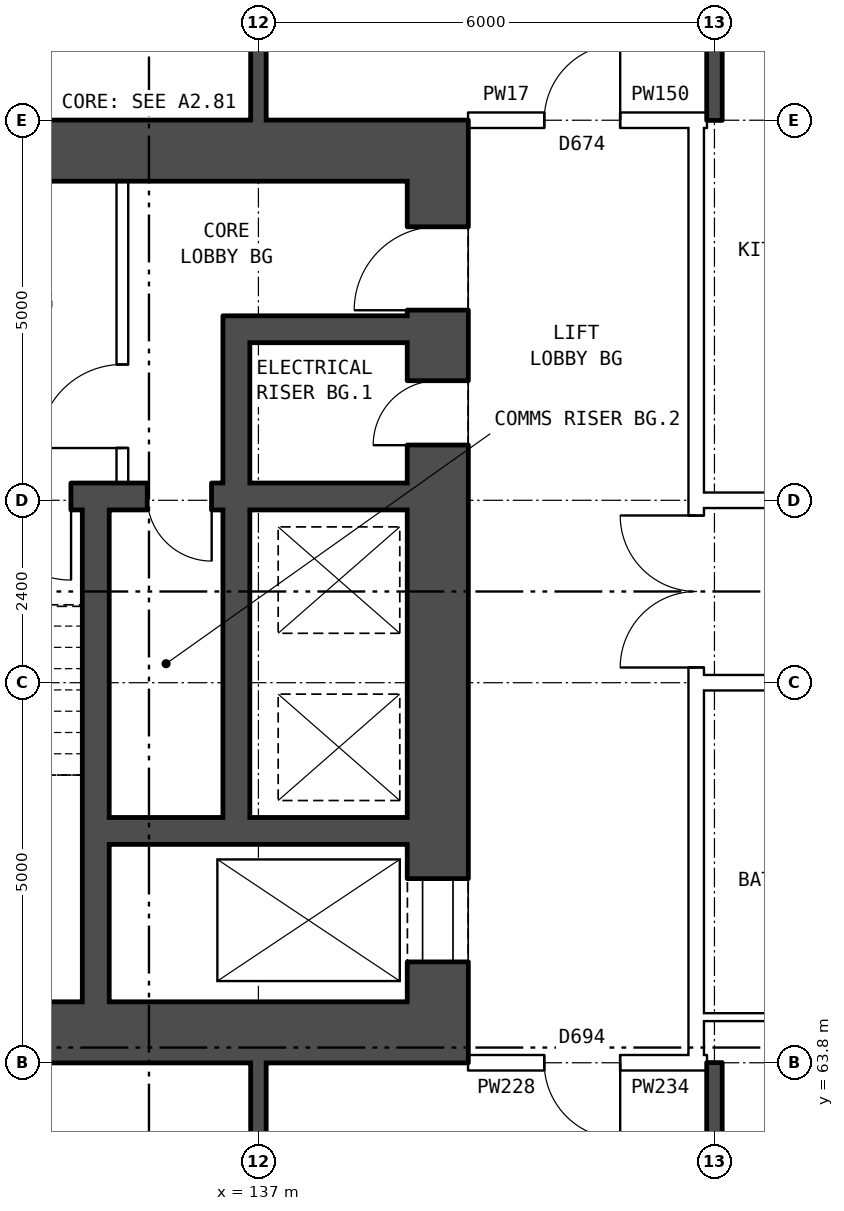
"""IFC4 building model, lengths in metres.
Left out: names, types, materials, properties, quantities, classifications, styles, units other than length and angle.
Written with IfcOpenShell. Run it as: python <this file> out.ifc"""

import sys

from ifc_helpers import new_model, si_unit, direction, frame, frame_2d, origin, place, context, subcontext, project, spatial, rectangle, extrude, element, fill, save


model = new_model("IFC4")
c1 = context("Model", 3, precision=1e-05, world=origin(), true_north=direction((0.0, 1.0)))
c2 = subcontext(c1, "Body", "Model", "MODEL_VIEW")
j1 = project(units=[si_unit("LENGTHUNIT", "METRE"), si_unit("PLANEANGLEUNIT", "RADIAN")], contexts=[c1])
p1 = place(None, origin())
s1 = spatial("IfcSite", under=j1, at=p1, CompositionType="ELEMENT")
p2 = place(p1, origin())
s2 = spatial("IfcBuilding", under=s1, at=p2, CompositionType="ELEMENT")
p3 = place(p2, frame((0.0, 0.0, 44.3)))
s3 = spatial("IfcBuildingStorey", under=s2, at=p3, CompositionType="ELEMENT", Elevation=44.3)
p4 = place(p3, frame((139.36, 64.6, 0.0), z_axis=(0.0, 0.0, 1.0), x_axis=(0.0, 1.0, 0.0)))
e1 = element("IfcWall", 1, at=p4, inside=s3, PredefinedType="SHEAR", context=c2, shape_type="SweptSolid", body=[
    extrude(rectangle(XDim=10.8, YDim=0.8, at=frame_2d((5.4, 0.0))), origin(), (0.0, 0.0, 1.0), 2.85),
])
p5 = place(p4, frame((0.525, 0.0, 0.0)))
e2 = element("IfcOpeningElement", 2, at=p5, cuts=e1, PredefinedType="OPENING", context=c2, shape_type="SweptSolid", body=[
    extrude(rectangle(XDim=1.1, YDim=2.1, at=frame_2d((0.55, 1.05))), frame((0.0, 0.41, 0.0), z_axis=(0.0, -1.0, 0.0), x_axis=(1.0, 0.0, 0.0)), (0.0, 0.0, 1.0), 0.82),
])
p6 = place(p4, frame((9.1, 0.0, 0.0)))
e3 = element("IfcOpeningElement", 3, at=p6, cuts=e1, PredefinedType="OPENING", context=c2, shape_type="SweptSolid", body=[
    extrude(rectangle(XDim=1.1, YDim=2.1, at=frame_2d((0.55, 1.05))), frame((0.0, 0.41, 0.0), z_axis=(0.0, -1.0, 0.0), x_axis=(1.0, 0.0, 0.0)), (0.0, 0.0, 1.0), 0.82),
])
p7 = place(p4, frame((7.325, 0.0, 0.0)))
e4 = element("IfcOpeningElement", 4, at=p7, cuts=e1, PredefinedType="OPENING", context=c2, shape_type="SweptSolid", body=[
    extrude(rectangle(XDim=0.85, YDim=2.1, at=frame_2d((0.425, 1.05))), frame((0.0, 0.41, 0.0), z_axis=(0.0, -1.0, 0.0), x_axis=(1.0, 0.0, 0.0)), (0.0, 0.0, 1.0), 0.82),
])
for number, where, z_axis, x_axis in (
    (5, (139.76, 64.2, 0.0), (0.0, 0.0, 1.0), (-1.0, 0.0, 0.0)),
    (6, (139.76, 75.8, 0.0), (0.0, 0.0, 1.0), (-1.0, 0.0, 0.0)),
):
    element("IfcWall", number, at=place(p3, frame(where, z_axis=z_axis, x_axis=x_axis)), inside=s3, PredefinedType="SHEAR", context=c2, shape_type="SweptSolid", body=[
        extrude(rectangle(XDim=8.4, YDim=0.8, at=frame_2d((4.2, 0.0))), origin(), (0.0, 0.0, 1.0), 2.85),
    ])
p8 = place(p3, frame((138.96, 66.85, 0.0), z_axis=(0.0, 0.0, 1.0), x_axis=(-1.0, 0.0, 0.0)))
e7 = element("IfcWall", 7, at=p8, inside=s3, PredefinedType="SHEAR", context=c2, shape_type="SweptSolid", body=[
    extrude(rectangle(XDim=3.925, YDim=0.35, at=frame_2d((1.962, 0.0))), origin(), (0.0, 0.0, 1.0), 2.85),
])
p9 = place(p3, frame((138.96, 71.25, 0.0), z_axis=(0.0, 0.0, 1.0), x_axis=(-1.0, 0.0, 0.0)))
e8 = element("IfcWall", 8, at=p9, inside=s3, PredefinedType="SHEAR", context=c2, shape_type="SweptSolid", body=[
    extrude(rectangle(XDim=6.8, YDim=0.35, at=frame_2d((3.4, 0.0))), origin(), (0.0, 0.0, 1.0), 2.85),
])
p10 = place(p9, frame((4.425, 0.0, 0.0)))
e9 = element("IfcOpeningElement", 9, at=p10, cuts=e8, PredefinedType="OPENING", context=c2, shape_type="SweptSolid", body=[
    extrude(rectangle(XDim=1.1, YDim=2.1, at=frame_2d((0.55, 1.05))), frame((0.0, 0.185, 0.0), z_axis=(0.0, -1.0, 0.0), x_axis=(1.0, 0.0, 0.0)), (0.0, 0.0, 1.0), 0.37),
])
p11 = place(p9, frame((2.575, 0.0, 0.0)))
e10 = element("IfcOpeningElement", 10, at=p11, cuts=e8, PredefinedType="OPENING", context=c2, shape_type="SweptSolid", body=[
    extrude(rectangle(XDim=0.85, YDim=2.1, at=frame_2d((0.425, 1.05))), frame((0.0, 0.185, 0.0), z_axis=(0.0, -1.0, 0.0), x_axis=(1.0, 0.0, 0.0)), (0.0, 0.0, 1.0), 0.37),
])
p12 = place(p3, frame((138.96, 73.45, 0.0), z_axis=(0.0, 0.0, 1.0), x_axis=(-1.0, 0.0, 0.0)))
e11 = element("IfcWall", 11, at=p12, inside=s3, PredefinedType="SHEAR", context=c2, shape_type="SweptSolid", body=[
    extrude(rectangle(XDim=2.075, YDim=0.35, at=frame_2d((1.038, 0.0))), origin(), (0.0, 0.0, 1.0), 2.85),
])
p13 = place(p3, frame((136.71, 67.025, 0.0), z_axis=(0.0, 0.0, 1.0), x_axis=(0.0, 1.0, 0.0)))
e12 = element("IfcWall", 12, at=p13, inside=s3, PredefinedType="SHEAR", context=c2, shape_type="SweptSolid", body=[
    extrude(rectangle(XDim=4.05, YDim=0.35, at=frame_2d((2.025, 0.0))), origin(), (0.0, 0.0, 1.0), 2.85),
])
p14 = place(p3, frame((136.71, 71.425, 0.0), z_axis=(0.0, 0.0, 1.0), x_axis=(0.0, 1.0, 0.0)))
e13 = element("IfcWall", 13, at=p14, inside=s3, PredefinedType="SHEAR", context=c2, shape_type="SweptSolid", body=[
    extrude(rectangle(XDim=2.2, YDim=0.35, at=frame_2d((1.1, 0.0))), origin(), (0.0, 0.0, 1.0), 2.85),
])
p15 = place(p3, frame((135.21, 71.425, 0.0), z_axis=(0.0, 0.0, 1.0), x_axis=(0.0, 1.0, 0.0)))
e14 = element("IfcWall", 14, at=p15, inside=s3, PredefinedType="PARTITIONING", context=c2, shape_type="SweptSolid", body=[
    extrude(rectangle(XDim=3.975, YDim=0.15, at=frame_2d((1.987, 0.0))), origin(), (0.0, 0.0, 1.0), 2.85),
])
p16 = place(p15, frame((0.462, 0.0, 0.0)))
e15 = element("IfcOpeningElement", 15, at=p16, cuts=e14, PredefinedType="OPENING", context=c2, shape_type="SweptSolid", body=[
    extrude(rectangle(XDim=1.1, YDim=2.1, at=frame_2d((0.55, 1.05))), frame((0.0, 0.085, 0.0), z_axis=(0.0, -1.0, 0.0), x_axis=(1.0, 0.0, 0.0)), (0.0, 0.0, 1.0), 0.17),
])
p17 = place(p3, frame((134.86, 64.6, 0.0), z_axis=(0.0, 0.0, 1.0), x_axis=(0.0, 1.0, 0.0)))
e16 = element("IfcWall", 16, at=p17, inside=s3, PredefinedType="SHEAR", context=c2, shape_type="SweptSolid", body=[
    extrude(rectangle(XDim=6.475, YDim=0.35, at=frame_2d((3.237, 0.0))), origin(), (0.0, 0.0, 1.0), 2.85),
])
p18 = place(p3, frame((142.76, 63.9, 0.0), z_axis=(0.0, 0.0, 1.0), x_axis=(0.0, 1.0, 0.0)))
e17 = element("IfcWall", 17, at=p18, inside=s3, PredefinedType="PARTITIONING", context=c2, shape_type="SweptSolid", body=[
    extrude(rectangle(XDim=12.2, YDim=0.2, at=frame_2d((6.1, 0.0))), origin(), (0.0, 0.0, 1.0), 2.85),
])
p19 = place(p18, frame((5.1, 0.0, 0.0)))
e18 = element("IfcOpeningElement", 18, at=p19, cuts=e17, PredefinedType="OPENING", context=c2, shape_type="SweptSolid", body=[
    extrude(rectangle(XDim=2.0, YDim=2.1, at=frame_2d((1.0, 1.05))), frame((0.0, 0.11, 0.0), z_axis=(0.0, -1.0, 0.0), x_axis=(1.0, 0.0, 0.0)), (0.0, 0.0, 1.0), 0.22),
])
p20 = place(p3, frame((139.76, 63.8, 0.0), z_axis=(0.0, 0.0, 1.0), x_axis=(1.0, 0.0, 0.0)))
e19 = element("IfcWall", 19, at=p20, inside=s3, PredefinedType="PARTITIONING", context=c2, shape_type="SweptSolid", body=[
    extrude(rectangle(XDim=3.0, YDim=0.2, at=frame_2d((1.5, 0.0))), origin(), (0.0, 0.0, 1.0), 2.85),
])
p21 = place(p20, frame((1.0, 0.0, 0.0)))
e20 = element("IfcOpeningElement", 20, at=p21, cuts=e19, PredefinedType="OPENING", context=c2, shape_type="SweptSolid", body=[
    extrude(rectangle(XDim=1.0, YDim=2.1, at=frame_2d((0.5, 1.05))), frame((0.0, 0.11, 0.0), z_axis=(0.0, -1.0, 0.0), x_axis=(1.0, 0.0, 0.0)), (0.0, 0.0, 1.0), 0.22),
])
p22 = place(p3, frame((142.76, 63.8, 0.0), z_axis=(0.0, 0.0, 1.0), x_axis=(1.0, 0.0, 0.0)))
e21 = element("IfcWall", 21, at=p22, inside=s3, PredefinedType="PARTITIONING", context=c2, shape_type="SweptSolid", body=[
    extrude(rectangle(XDim=0.14, YDim=0.2, at=frame_2d((0.07, 0.0))), origin(), (0.0, 0.0, 1.0), 2.85),
])
p23 = place(p3, frame((142.76, 64.4, 0.0), z_axis=(0.0, 0.0, 1.0), x_axis=(1.0, 0.0, 0.0)))
e22 = element("IfcWall", 22, at=p23, inside=s3, PredefinedType="PARTITIONING", context=c2, shape_type="SweptSolid", body=[
    extrude(rectangle(XDim=3.24, YDim=0.1, at=frame_2d((1.62, 0.0))), origin(), (0.0, 0.0, 1.0), 2.85),
])
p24 = place(p3, frame((142.76, 68.8, 0.0), z_axis=(0.0, 0.0, 1.0), x_axis=(1.0, 0.0, 0.0)))
e23 = element("IfcWall", 23, at=p24, inside=s3, PredefinedType="PARTITIONING", context=c2, shape_type="SweptSolid", body=[
    extrude(rectangle(XDim=14.48, YDim=0.2, at=frame_2d((7.24, 0.0))), origin(), (0.0, 0.0, 1.0), 2.85),
])
p25 = place(p24, frame((4.24, 0.0, 0.0)))
e24 = element("IfcOpeningElement", 24, at=p25, cuts=e23, PredefinedType="OPENING", context=c2, shape_type="SweptSolid", body=[
    extrude(rectangle(XDim=1.0, YDim=2.1, at=frame_2d((0.5, 1.05))), frame((0.0, 0.11, 0.0), z_axis=(0.0, -1.0, 0.0), x_axis=(1.0, 0.0, 0.0)), (0.0, 0.0, 1.0), 0.22),
])
p26 = place(p24, frame((10.24, 0.0, 0.0)))
e25 = element("IfcOpeningElement", 25, at=p26, cuts=e23, PredefinedType="OPENING", context=c2, shape_type="SweptSolid", body=[
    extrude(rectangle(XDim=1.0, YDim=2.1, at=frame_2d((0.5, 1.05))), frame((0.0, 0.11, 0.0), z_axis=(0.0, -1.0, 0.0), x_axis=(1.0, 0.0, 0.0)), (0.0, 0.0, 1.0), 0.22),
])
p27 = place(p3, frame((142.76, 71.2, 0.0), z_axis=(0.0, 0.0, 1.0), x_axis=(1.0, 0.0, 0.0)))
e26 = element("IfcWall", 26, at=p27, inside=s3, PredefinedType="PARTITIONING", context=c2, shape_type="SweptSolid", body=[
    extrude(rectangle(XDim=14.48, YDim=0.2, at=frame_2d((7.24, 0.0))), origin(), (0.0, 0.0, 1.0), 2.85),
])
p28 = place(p27, frame((1.12, 0.0, 0.0)))
e27 = element("IfcOpeningElement", 27, at=p28, cuts=e26, PredefinedType="OPENING", context=c2, shape_type="SweptSolid", body=[
    extrude(rectangle(XDim=1.0, YDim=2.1, at=frame_2d((0.5, 1.05))), frame((0.0, 0.11, 0.0), z_axis=(0.0, -1.0, 0.0), x_axis=(1.0, 0.0, 0.0)), (0.0, 0.0, 1.0), 0.22),
])
p29 = place(p27, frame((7.24, 0.0, 0.0)))
e28 = element("IfcOpeningElement", 28, at=p29, cuts=e26, PredefinedType="OPENING", context=c2, shape_type="SweptSolid", body=[
    extrude(rectangle(XDim=1.0, YDim=2.1, at=frame_2d((0.5, 1.05))), frame((0.0, 0.11, 0.0), z_axis=(0.0, -1.0, 0.0), x_axis=(1.0, 0.0, 0.0)), (0.0, 0.0, 1.0), 0.22),
])
p30 = place(p3, frame((139.76, 76.2, 0.0), z_axis=(0.0, 0.0, 1.0), x_axis=(1.0, 0.0, 0.0)))
e29 = element("IfcWall", 29, at=p30, inside=s3, PredefinedType="PARTITIONING", context=c2, shape_type="SweptSolid", body=[
    extrude(rectangle(XDim=3.0, YDim=0.2, at=frame_2d((1.5, 0.0))), origin(), (0.0, 0.0, 1.0), 2.85),
])
p31 = place(p30, frame((1.0, 0.0, 0.0)))
e30 = element("IfcOpeningElement", 30, at=p31, cuts=e29, PredefinedType="OPENING", context=c2, shape_type="SweptSolid", body=[
    extrude(rectangle(XDim=1.0, YDim=2.1, at=frame_2d((0.5, 1.05))), frame((0.0, 0.11, 0.0), z_axis=(0.0, -1.0, 0.0), x_axis=(1.0, 0.0, 0.0)), (0.0, 0.0, 1.0), 0.22),
])
p32 = place(p3, frame((142.76, 76.2, 0.0), z_axis=(0.0, 0.0, 1.0), x_axis=(1.0, 0.0, 0.0)))
e31 = element("IfcWall", 31, at=p32, inside=s3, PredefinedType="PARTITIONING", context=c2, shape_type="SweptSolid", body=[
    extrude(rectangle(XDim=0.14, YDim=0.2, at=frame_2d((0.07, 0.0))), origin(), (0.0, 0.0, 1.0), 2.85),
])
p33 = place(p3, frame((137.0, 54.36, 0.0), z_axis=(0.0, 0.0, 1.0), x_axis=(0.0, 1.0, 0.0)))
e32 = element("IfcWall", 32, at=p33, inside=s3, PredefinedType="SOLIDWALL", context=c2, shape_type="SweptSolid", body=[
    extrude(rectangle(XDim=9.44, YDim=0.2, at=frame_2d((4.72, 0.0))), origin(), (0.0, 0.0, 1.0), 2.85),
])
p34 = place(p33, frame((7.04, 0.0, 0.0)))
e33 = element("IfcOpeningElement", 33, at=p34, cuts=e32, PredefinedType="OPENING", context=c2, shape_type="SweptSolid", body=[
    extrude(rectangle(XDim=0.9, YDim=2.1, at=frame_2d((0.45, 1.05))), frame((0.0, 0.11, 0.0), z_axis=(0.0, -1.0, 0.0), x_axis=(1.0, 0.0, 0.0)), (0.0, 0.0, 1.0), 0.22),
])
p35 = place(p3, frame((137.0, 76.2, 0.0), z_axis=(0.0, 0.0, 1.0), x_axis=(0.0, 1.0, 0.0)))
e34 = element("IfcWall", 34, at=p35, inside=s3, PredefinedType="SOLIDWALL", context=c2, shape_type="SweptSolid", body=[
    extrude(rectangle(XDim=9.44, YDim=0.2, at=frame_2d((4.72, 0.0))), origin(), (0.0, 0.0, 1.0), 2.85),
])
p36 = place(p35, frame((1.2, 0.0, 0.0)))
e35 = element("IfcOpeningElement", 35, at=p36, cuts=e34, PredefinedType="OPENING", context=c2, shape_type="SweptSolid", body=[
    extrude(rectangle(XDim=0.9, YDim=2.1, at=frame_2d((0.45, 1.05))), frame((0.0, 0.11, 0.0), z_axis=(0.0, -1.0, 0.0), x_axis=(1.0, 0.0, 0.0)), (0.0, 0.0, 1.0), 0.22),
])
for number, where, z_axis, x_axis in (
    (36, (143.0, 54.36, 0.0), (0.0, 0.0, 1.0), (0.0, 1.0, 0.0)),
    (37, (143.0, 76.2, 0.0), (0.0, 0.0, 1.0), (0.0, 1.0, 0.0)),
):
    element("IfcWall", number, at=place(p3, frame(where, z_axis=z_axis, x_axis=x_axis)), inside=s3, PredefinedType="SOLIDWALL", context=c2, shape_type="SweptSolid", body=[
        extrude(rectangle(XDim=9.44, YDim=0.2, at=frame_2d((4.72, 0.0))), origin(), (0.0, 0.0, 1.0), 2.85),
    ])
p37 = place(p5, origin())
e38 = element("IfcDoor", 38, at=p37, inside=s3, OperationType="DOUBLE_DOOR_SLIDING", PredefinedType="DOOR", context=c2, shape_type="SweptSolid", body=[
    extrude(rectangle(XDim=1.1, YDim=2.1, at=frame_2d((0.55, 1.05))), frame((0.0, 0.385, 0.0), z_axis=(0.0, -1.0, 0.0), x_axis=(1.0, 0.0, 0.0)), (0.0, 0.0, 1.0), 0.05),
])
fill(e2, e38)
p38 = place(p6, origin())
e39 = element("IfcDoor", 39, at=p38, inside=s3, OperationType="SINGLE_SWING_LEFT", PredefinedType="DOOR", context=c2, shape_type="SweptSolid", body=[
    extrude(rectangle(XDim=1.1, YDim=2.1, at=frame_2d((0.55, 1.05))), frame((0.0, 0.385, 0.0), z_axis=(0.0, -1.0, 0.0), x_axis=(1.0, 0.0, 0.0)), (0.0, 0.0, 1.0), 0.05),
])
fill(e3, e39)
p39 = place(p16, origin())
e40 = element("IfcDoor", 40, at=p39, inside=s3, OperationType="SINGLE_SWING_LEFT", PredefinedType="DOOR", context=c2, shape_type="SweptSolid", body=[
    extrude(rectangle(XDim=1.1, YDim=2.1, at=frame_2d((0.55, 1.05))), frame((0.0, 0.025, 0.0), z_axis=(0.0, -1.0, 0.0), x_axis=(1.0, 0.0, 0.0)), (0.0, 0.0, 1.0), 0.05),
])
fill(e15, e40)
p40 = place(p10, origin())
e41 = element("IfcDoor", 41, at=p40, inside=s3, OperationType="SINGLE_SWING_LEFT", PredefinedType="DOOR", context=c2, shape_type="SweptSolid", body=[
    extrude(rectangle(XDim=1.1, YDim=2.1, at=frame_2d((0.55, 1.05))), frame((0.0, 0.025, 0.0), z_axis=(0.0, -1.0, 0.0), x_axis=(1.0, 0.0, 0.0)), (0.0, 0.0, 1.0), 0.05),
])
fill(e9, e41)
p41 = place(p7, origin())
e42 = element("IfcDoor", 42, at=p41, inside=s3, OperationType="SINGLE_SWING_LEFT", PredefinedType="DOOR", context=c2, shape_type="SweptSolid", body=[
    extrude(rectangle(XDim=0.85, YDim=2.1, at=frame_2d((0.425, 1.05))), frame((0.0, 0.385, 0.0), z_axis=(0.0, -1.0, 0.0), x_axis=(1.0, 0.0, 0.0)), (0.0, 0.0, 1.0), 0.05),
])
fill(e4, e42)
p42 = place(p11, origin())
e43 = element("IfcDoor", 43, at=p42, inside=s3, OperationType="SINGLE_SWING_LEFT", PredefinedType="DOOR", context=c2, shape_type="SweptSolid", body=[
    extrude(rectangle(XDim=0.85, YDim=2.1, at=frame_2d((0.425, 1.05))), frame((0.0, 0.025, 0.0), z_axis=(0.0, -1.0, 0.0), x_axis=(1.0, 0.0, 0.0)), (0.0, 0.0, 1.0), 0.05),
])
fill(e10, e43)
p43 = place(p19, origin())
e44 = element("IfcDoor", 44, at=p43, inside=s3, OperationType="DOUBLE_DOOR_SINGLE_SWING", PredefinedType="DOOR", context=c2, shape_type="SweptSolid", body=[
    extrude(rectangle(XDim=2.0, YDim=2.1, at=frame_2d((1.0, 1.05))), frame((0.0, 0.025, 0.0), z_axis=(0.0, -1.0, 0.0), x_axis=(1.0, 0.0, 0.0)), (0.0, 0.0, 1.0), 0.05),
])
fill(e18, e44)
p44 = place(p21, frame((1.0, 0.0, 0.0), z_axis=(0.0, 0.0, 1.0), x_axis=(-1.0, 0.0, 0.0)))
e45 = element("IfcDoor", 45, at=p44, inside=s3, OperationType="SINGLE_SWING_LEFT", PredefinedType="DOOR", context=c2, shape_type="SweptSolid", body=[
    extrude(rectangle(XDim=1.0, YDim=2.1, at=frame_2d((0.5, 1.05))), frame((0.0, 0.025, 0.0), z_axis=(0.0, -1.0, 0.0), x_axis=(1.0, 0.0, 0.0)), (0.0, 0.0, 1.0), 0.05),
])
fill(e20, e45)
p45 = place(p31, origin())
e46 = element("IfcDoor", 46, at=p45, inside=s3, OperationType="SINGLE_SWING_RIGHT", PredefinedType="DOOR", context=c2, shape_type="SweptSolid", body=[
    extrude(rectangle(XDim=1.0, YDim=2.1, at=frame_2d((0.5, 1.05))), frame((0.0, 0.025, 0.0), z_axis=(0.0, -1.0, 0.0), x_axis=(1.0, 0.0, 0.0)), (0.0, 0.0, 1.0), 0.05),
])
fill(e30, e46)
save(model, sys.argv[1])
